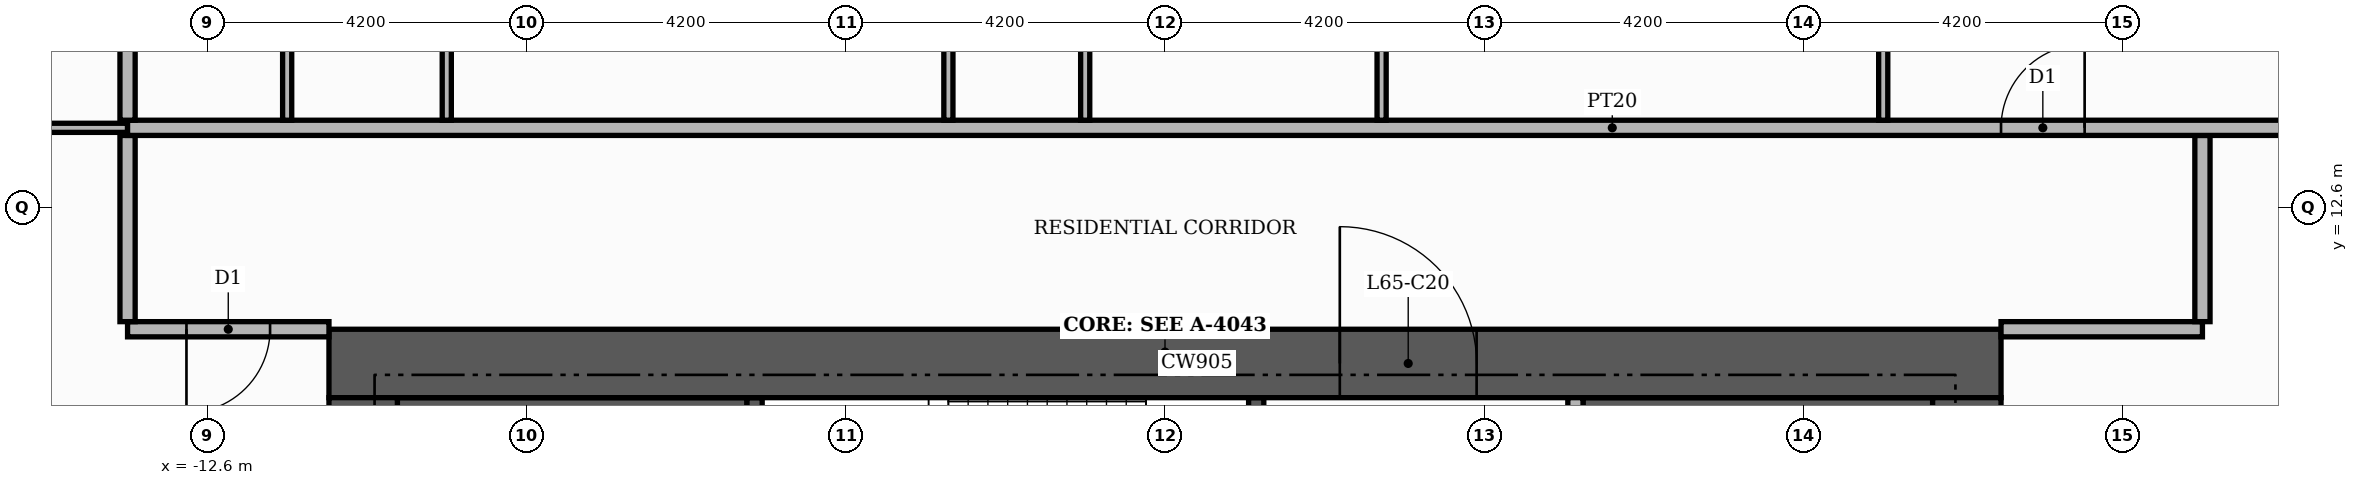
"""IFC4 building model, lengths in metres.
Left out: names, types, materials, properties, quantities, classifications, styles, units other than length and angle.
Written with IfcOpenShell. Run it as: python <this file> out.ifc"""

import sys

from ifc_helpers import new_model, si_unit, direction, frame, frame_2d, origin, place, context, subcontext, project, spatial, rectangle, extrude, element, fill, save


model = new_model("IFC4")
c1 = context("Model", 3, precision=1e-05, world=origin(), true_north=direction((0.0, 1.0)))
c2 = subcontext(c1, "Body", "Model", "MODEL_VIEW")
j1 = project(units=[si_unit("LENGTHUNIT", "METRE"), si_unit("PLANEANGLEUNIT", "RADIAN")], contexts=[c1])
p1 = place(None, origin())
s1 = spatial("IfcSite", under=j1, at=p1, CompositionType="ELEMENT")
p2 = place(p1, origin())
s2 = spatial("IfcBuilding", under=s1, at=p2, CompositionType="ELEMENT")
p3 = place(p2, frame((0.0, 0.0, 271.8)))
s3 = spatial("IfcBuildingStorey", under=s2, at=p3, CompositionType="ELEMENT", Elevation=271.8)
for number, where, z_axis, x_axis in (
    (1, (-10.1, 9.15, 0.0), (0.0, 0.0, 1.0), (1.0, 0.0, 0.0)),
    (2, (5.5, 9.15, 0.0), (0.0, 0.0, 1.0), (1.0, 0.0, 0.0)),
):
    element("IfcWall", number, at=place(p3, frame(where, z_axis=z_axis, x_axis=x_axis)), inside=s3, PredefinedType="SHEAR", context=c2, shape_type="SweptSolid", body=[
        extrude(rectangle(XDim=4.6, YDim=1.9, at=frame_2d((2.3, 0.0))), origin(), (0.0, 0.0, 1.0), 3.48),
    ])
p4 = place(p3, frame((-5.4, 7.25, 0.0), z_axis=(0.0, 0.0, 1.0), x_axis=(0.0, 1.0, 0.0)))
e3 = element("IfcWall", 3, at=p4, inside=s3, PredefinedType="SHEAR", context=c2, shape_type="SweptSolid", body=[
    extrude(rectangle(XDim=2.85, YDim=0.2, at=frame_2d((1.425, 0.0))), origin(), (0.0, 0.0, 1.0), 3.48),
])
p5 = place(p3, frame((1.2, 7.25, 0.0), z_axis=(0.0, 0.0, 1.0), x_axis=(0.0, 1.0, 0.0)))
e4 = element("IfcWall", 4, at=p5, inside=s3, PredefinedType="SHEAR", context=c2, shape_type="SweptSolid", body=[
    extrude(rectangle(XDim=2.85, YDim=0.2, at=frame_2d((1.425, 0.0))), origin(), (0.0, 0.0, 1.0), 3.48),
])
p6 = place(p5, frame((0.85, 0.0, 0.0)))
e5 = element("IfcOpeningElement", 5, at=p6, cuts=e4, PredefinedType="OPENING", context=c2, shape_type="SweptSolid", body=[
    extrude(rectangle(XDim=1.0, YDim=2.1, at=frame_2d((0.5, 1.05))), frame((0.0, 0.11, 0.0), z_axis=(0.0, -1.0, 0.0), x_axis=(1.0, 0.0, 0.0)), (0.0, 0.0, 1.0), 0.22),
])
p7 = place(p3, frame((-11.0, 10.55, 0.0), z_axis=(0.0, 0.0, 1.0), x_axis=(1.0, 0.0, 0.0)))
e6 = element("IfcWall", 6, at=p7, inside=s3, PredefinedType="SHEAR", context=c2, shape_type="SweptSolid", body=[
    extrude(rectangle(XDim=22.0, YDim=0.9, at=frame_2d((11.0, 0.0))), origin(), (0.0, 0.0, 1.0), 3.48),
])
p8 = place(p7, frame((13.3, 0.0, 0.0)))
e7 = element("IfcOpeningElement", 7, at=p8, cuts=e6, PredefinedType="OPENING", context=c2, shape_type="SweptSolid", body=[
    extrude(rectangle(XDim=1.8, YDim=2.2, at=frame_2d((0.9, 1.1))), frame((0.0, 0.46, 0.0), z_axis=(0.0, -1.0, 0.0), x_axis=(1.0, 0.0, 0.0)), (0.0, 0.0, 1.0), 0.92),
])
for number, where, z_axis, x_axis in (
    (8, (-10.55, -10.1, 0.0), (0.0, 0.0, 1.0), (0.0, 1.0, 0.0)),
    (9, (10.55, -10.1, 0.0), (0.0, 0.0, 1.0), (0.0, 1.0, 0.0)),
):
    element("IfcWall", number, at=place(p3, frame(where, z_axis=z_axis, x_axis=x_axis)), inside=s3, PredefinedType="SHEAR", context=c2, shape_type="SweptSolid", body=[
        extrude(rectangle(XDim=20.2, YDim=0.9, at=frame_2d((10.1, 0.0))), origin(), (0.0, 0.0, 1.0), 3.48),
    ])
p9 = place(p3, frame((5.4, 5.5, 0.0), z_axis=(0.0, 0.0, 1.0), x_axis=(0.0, 1.0, 0.0)))
e10 = element("IfcWall", 10, at=p9, inside=s3, PredefinedType="PARTITIONING", context=c2, shape_type="SweptSolid", body=[
    extrude(rectangle(XDim=4.6, YDim=0.2, at=frame_2d((2.3, 0.0))), origin(), (0.0, 0.0, 1.0), 3.48),
])
p10 = place(p9, frame((0.25, 0.0, 0.0)))
e11 = element("IfcOpeningElement", 11, at=p10, cuts=e10, PredefinedType="OPENING", context=c2, shape_type="SweptSolid", body=[
    extrude(rectangle(XDim=1.0, YDim=2.1, at=frame_2d((0.5, 1.05))), frame((0.0, 0.11, 0.0), z_axis=(0.0, -1.0, 0.0), x_axis=(1.0, 0.0, 0.0)), (0.0, 0.0, 1.0), 0.22),
])
p11 = place(p3, frame((-13.65, 11.0, 0.0), z_axis=(0.0, 0.0, 1.0), x_axis=(1.0, 0.0, 0.0)))
e12 = element("IfcWall", 12, at=p11, inside=s3, PredefinedType="PARTITIONING", context=c2, shape_type="SweptSolid", body=[
    extrude(rectangle(XDim=2.65, YDim=0.2, at=frame_2d((1.325, 0.0))), origin(), (0.0, 0.0, 1.0), 3.48),
])
p12 = place(p11, frame((0.775, 0.0, 0.0)))
e13 = element("IfcOpeningElement", 13, at=p12, cuts=e12, PredefinedType="OPENING", context=c2, shape_type="SweptSolid", body=[
    extrude(rectangle(XDim=1.1, YDim=2.4, at=frame_2d((0.55, 1.2))), frame((0.0, 0.11, 0.0), z_axis=(0.0, -1.0, 0.0), x_axis=(1.0, 0.0, 0.0)), (0.0, 0.0, 1.0), 0.22),
])
p13 = place(p3, frame((11.0, 11.0, 0.0), z_axis=(0.0, 0.0, 1.0), x_axis=(1.0, 0.0, 0.0)))
e14 = element("IfcWall", 14, at=p13, inside=s3, PredefinedType="PARTITIONING", context=c2, shape_type="SweptSolid", body=[
    extrude(rectangle(XDim=2.65, YDim=0.2, at=frame_2d((1.325, 0.0))), origin(), (0.0, 0.0, 1.0), 3.48),
])
for number, where, z_axis, x_axis in (
    (15, (-13.65, 11.1, 0.0), (0.0, 0.0, 1.0), (0.0, 1.0, 0.0)),
    (16, (13.65, 11.1, 0.0), (0.0, 0.0, 1.0), (0.0, 1.0, 0.0)),
):
    element("IfcWall", number, at=place(p3, frame(where, z_axis=z_axis, x_axis=x_axis)), inside=s3, PredefinedType="PARTITIONING", context=c2, shape_type="SweptSolid", body=[
        extrude(rectangle(XDim=2.45, YDim=0.2, at=frame_2d((1.225, 0.0))), origin(), (0.0, 0.0, 1.0), 3.48),
    ])
p14 = place(p3, frame((-20.42, 13.65, 0.0), z_axis=(0.0, 0.0, 1.0), x_axis=(1.0, 0.0, 0.0)))
e17 = element("IfcWall", 17, at=p14, inside=s3, PredefinedType="PARTITIONING", context=c2, shape_type="SweptSolid", body=[
    extrude(rectangle(XDim=6.77, YDim=0.12, at=frame_2d((3.385, 0.0))), origin(), (0.0, 0.0, 1.0), 3.48),
])
p15 = place(p14, frame((2.885, 0.0, 0.0)))
e18 = element("IfcOpeningElement", 18, at=p15, cuts=e17, PredefinedType="OPENING", context=c2, shape_type="SweptSolid", body=[
    extrude(rectangle(XDim=1.0, YDim=2.1, at=frame_2d((0.5, 1.05))), frame((0.0, 0.07, 0.0), z_axis=(0.0, -1.0, 0.0), x_axis=(1.0, 0.0, 0.0)), (0.0, 0.0, 1.0), 0.14),
])
p16 = place(p3, frame((-13.65, 13.65, 0.0), z_axis=(0.0, 0.0, 1.0), x_axis=(1.0, 0.0, 0.0)))
e19 = element("IfcWall", 19, at=p16, inside=s3, PredefinedType="PARTITIONING", context=c2, shape_type="SweptSolid", body=[
    extrude(rectangle(XDim=39.07, YDim=0.2, at=frame_2d((19.535, 0.0))), origin(), (0.0, 0.0, 1.0), 3.48),
])
p17 = place(p16, frame((24.65, 0.0, 0.0)))
e20 = element("IfcOpeningElement", 20, at=p17, cuts=e19, PredefinedType="OPENING", context=c2, shape_type="SweptSolid", body=[
    extrude(rectangle(XDim=1.1, YDim=2.4, at=frame_2d((0.55, 1.2))), frame((0.0, 0.11, 0.0), z_axis=(0.0, -1.0, 0.0), x_axis=(1.0, 0.0, 0.0)), (0.0, 0.0, 1.0), 0.22),
])
p18 = place(p3, frame((-13.65, 13.75, 0.0), z_axis=(0.0, 0.0, 1.0), x_axis=(0.0, 1.0, 0.0)))
e21 = element("IfcWall", 21, at=p18, inside=s3, PredefinedType="PARTITIONING", context=c2, shape_type="SweptSolid", body=[
    extrude(rectangle(XDim=11.67, YDim=0.2, at=frame_2d((5.835, 0.0))), origin(), (0.0, 0.0, 1.0), 3.48),
])
for number, where, z_axis, x_axis in (
    (22, (-11.55, 13.75, 0.0), (0.0, 0.0, 1.0), (0.0, 1.0, 0.0)),
    (23, (-9.45, 13.75, 0.0), (0.0, 0.0, 1.0), (0.0, 1.0, 0.0)),
    (24, (-2.85, 13.75, 0.0), (0.0, 0.0, 1.0), (0.0, 1.0, 0.0)),
    (25, (-1.05, 13.75, 0.0), (0.0, 0.0, 1.0), (0.0, 1.0, 0.0)),
    (26, (2.85, 13.75, 0.0), (0.0, 0.0, 1.0), (0.0, 1.0, 0.0)),
    (27, (9.45, 13.75, 0.0), (0.0, 0.0, 1.0), (0.0, 1.0, 0.0)),
):
    element("IfcWall", number, at=place(p3, frame(where, z_axis=z_axis, x_axis=x_axis)), inside=s3, PredefinedType="PARTITIONING", context=c2, shape_type="SweptSolid", body=[
        extrude(rectangle(XDim=4.81, YDim=0.12, at=frame_2d((2.405, 0.0))), origin(), (0.0, 0.0, 1.0), 3.48),
    ])
p19 = place(p8, origin())
e28 = element("IfcDoor", 28, at=p19, inside=s3, OperationType="DOUBLE_DOOR_SINGLE_SWING", PredefinedType="DOOR", context=c2, shape_type="SweptSolid", body=[
    extrude(rectangle(XDim=1.8, YDim=2.2, at=frame_2d((0.9, 1.1))), frame((0.0, 0.025, 0.0), z_axis=(0.0, -1.0, 0.0), x_axis=(1.0, 0.0, 0.0)), (0.0, 0.0, 1.0), 0.05),
])
fill(e7, e28)
p20 = place(p17, origin())
e29 = element("IfcDoor", 29, at=p20, inside=s3, OperationType="SINGLE_SWING_RIGHT", PredefinedType="DOOR", context=c2, shape_type="SweptSolid", body=[
    extrude(rectangle(XDim=1.1, YDim=2.4, at=frame_2d((0.55, 1.2))), frame((0.0, 0.025, 0.0), z_axis=(0.0, -1.0, 0.0), x_axis=(1.0, 0.0, 0.0)), (0.0, 0.0, 1.0), 0.05),
])
fill(e20, e29)
p21 = place(p12, frame((1.1, 0.0, 0.0), z_axis=(0.0, 0.0, 1.0), x_axis=(-1.0, 0.0, 0.0)))
e30 = element("IfcDoor", 30, at=p21, inside=s3, OperationType="SINGLE_SWING_LEFT", PredefinedType="DOOR", context=c2, shape_type="SweptSolid", body=[
    extrude(rectangle(XDim=1.1, YDim=2.4, at=frame_2d((0.55, 1.2))), frame((0.0, 0.025, 0.0), z_axis=(0.0, -1.0, 0.0), x_axis=(1.0, 0.0, 0.0)), (0.0, 0.0, 1.0), 0.05),
])
fill(e13, e30)
save(model, sys.argv[1])
